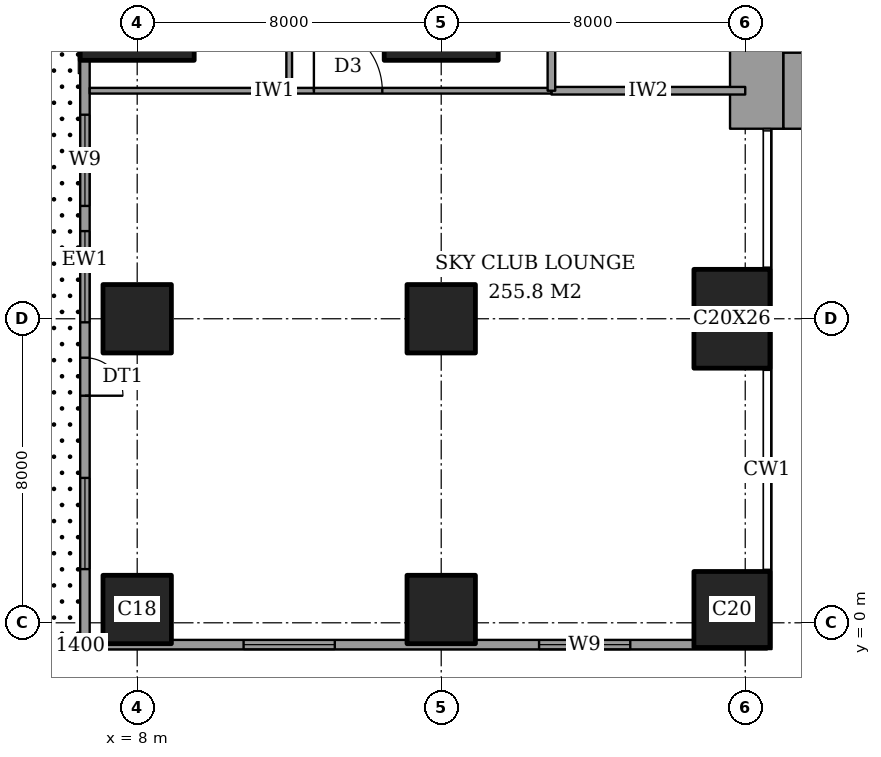
"""IFC4 building model, lengths in metres.
Left out: names, types, materials, properties, quantities, classifications, styles, units other than length and angle.
Written with IfcOpenShell. Run it as: python <this file> out.ifc"""

import sys

from ifc_helpers import new_model, si_unit, direction, frame, frame_2d, origin, origin_2d, place, context, subcontext, project, spatial, rectangle, extrude, element, fill, save


model = new_model("IFC4")
c1 = context("Model", 3, precision=1e-05, world=origin(), true_north=direction((0.0, 1.0)))
c2 = subcontext(c1, "Body", "Model", "MODEL_VIEW")
j1 = project(units=[si_unit("LENGTHUNIT", "METRE"), si_unit("PLANEANGLEUNIT", "RADIAN")], contexts=[c1])
p1 = place(None, origin())
s1 = spatial("IfcSite", under=j1, at=p1, CompositionType="ELEMENT")
p2 = place(p1, origin())
s2 = spatial("IfcBuilding", under=s1, at=p2, CompositionType="ELEMENT")
p3 = place(p2, frame((0.0, 0.0, 218.2)))
s3 = spatial("IfcBuildingStorey", under=s2, at=p3, CompositionType="ELEMENT", Elevation=218.2)
for number, where, z_axis, x_axis in (
    (1, (8.0, 0.35, 0.0), (0.0, 0.0, 1.0), (1.0, 0.0, 0.0)),
    (2, (8.0, 8.0, 0.0), (0.0, 0.0, 1.0), (1.0, 0.0, 0.0)),
):
    element("IfcColumn", number, at=place(p3, frame(where, z_axis=z_axis, x_axis=x_axis)), inside=s3, PredefinedType="COLUMN", context=c2, shape_type="SweptSolid", body=[
        extrude(rectangle(XDim=1.8, YDim=1.8, at=origin_2d()), origin(), (0.0, 0.0, 1.0), 3.6),
    ])
p4 = place(p3, frame((8.0, 16.0, 0.0), z_axis=(0.0, 0.0, 1.0), x_axis=(1.0, 0.0, 0.0)))
e3 = element("IfcColumn", 3, at=p4, inside=s3, PredefinedType="COLUMN", context=c2, shape_type="SweptSolid", body=[
    extrude(rectangle(XDim=3.0, YDim=2.4, at=origin_2d()), origin(), (0.0, 0.0, 1.0), 3.6),
])
for number, where, z_axis, x_axis in (
    (4, (16.0, 0.35, 0.0), (0.0, 0.0, 1.0), (1.0, 0.0, 0.0)),
    (5, (16.0, 8.0, 0.0), (0.0, 0.0, 1.0), (1.0, 0.0, 0.0)),
):
    element("IfcColumn", number, at=place(p3, frame(where, z_axis=z_axis, x_axis=x_axis)), inside=s3, PredefinedType="COLUMN", context=c2, shape_type="SweptSolid", body=[
        extrude(rectangle(XDim=1.8, YDim=1.8, at=origin_2d()), origin(), (0.0, 0.0, 1.0), 3.6),
    ])
p5 = place(p3, frame((16.0, 16.0, 0.0), z_axis=(0.0, 0.0, 1.0), x_axis=(1.0, 0.0, 0.0)))
e6 = element("IfcColumn", 6, at=p5, inside=s3, PredefinedType="COLUMN", context=c2, shape_type="SweptSolid", body=[
    extrude(rectangle(XDim=3.0, YDim=2.4, at=origin_2d()), origin(), (0.0, 0.0, 1.0), 3.6),
])
p6 = place(p3, frame((23.65, 0.35, 0.0), z_axis=(0.0, 0.0, 1.0), x_axis=(1.0, 0.0, 0.0)))
e7 = element("IfcColumn", 7, at=p6, inside=s3, PredefinedType="COLUMN", context=c2, shape_type="SweptSolid", body=[
    extrude(rectangle(XDim=2.0, YDim=2.0, at=origin_2d()), origin(), (0.0, 0.0, 1.0), 3.6),
])
p7 = place(p3, frame((23.65, 8.0, 0.0), z_axis=(0.0, 0.0, 1.0), x_axis=(1.0, 0.0, 0.0)))
e8 = element("IfcColumn", 8, at=p7, inside=s3, PredefinedType="COLUMN", context=c2, shape_type="SweptSolid", body=[
    extrude(rectangle(XDim=2.0, YDim=2.6, at=origin_2d()), origin(), (0.0, 0.0, 1.0), 3.6),
])
p8 = place(p3, frame((25.0, 14.0, 0.0), z_axis=(0.0, 0.0, 1.0), x_axis=(1.0, 0.0, 0.0)))
e9 = element("IfcWall", 9, at=p8, inside=s3, PredefinedType="SHEAR", context=c2, shape_type="SweptSolid", body=[
    extrude(rectangle(XDim=3.15, YDim=2.0, at=frame_2d((1.575, 0.0))), origin(), (0.0, 0.0, 1.0), 3.6),
])
p9 = place(p3, frame((24.3, 13.0, 0.0), z_axis=(0.0, 0.0, 1.0), x_axis=(0.0, 1.0, 0.0)))
e10 = element("IfcWall", 10, at=p9, inside=s3, PredefinedType="SHEAR", context=c2, shape_type="SweptSolid", body=[
    extrude(rectangle(XDim=10.15, YDim=1.4, at=frame_2d((5.075, 0.0))), origin(), (0.0, 0.0, 1.0), 3.6),
])
p10 = place(p3, frame((6.625, 19.65, 0.0), z_axis=(0.0, 0.0, 1.0), x_axis=(0.0, -1.0, 0.0)))
e11 = element("IfcWall", 11, at=p10, inside=s3, PredefinedType="SOLIDWALL", context=c2, shape_type="SweptSolid", body=[
    extrude(rectangle(XDim=20.225, YDim=0.25, at=frame_2d((10.112, 0.0))), origin(), (0.0, 0.0, 1.0), 3.6),
])
p11 = place(p10, frame((0.725, 0.0, 0.0)))
e12 = element("IfcOpeningElement", 12, at=p11, cuts=e11, PredefinedType="OPENING", context=c2, shape_type="SweptSolid", body=[
    extrude(rectangle(XDim=1.0, YDim=2.4, at=frame_2d((0.5, 1.2))), frame((0.0, 0.135, 0.0), z_axis=(0.0, -1.0, 0.0), x_axis=(1.0, 0.0, 0.0)), (0.0, 0.0, 1.0), 0.27),
])
p12 = place(p10, frame((12.675, 0.0, 0.0)))
e13 = element("IfcOpeningElement", 13, at=p12, cuts=e11, PredefinedType="OPENING", context=c2, shape_type="SweptSolid", body=[
    extrude(rectangle(XDim=1.0, YDim=2.4, at=frame_2d((0.5, 1.2))), frame((0.0, 0.135, 0.0), z_axis=(0.0, -1.0, 0.0), x_axis=(1.0, 0.0, 0.0)), (0.0, 0.0, 1.0), 0.27),
])
p13 = place(p10, frame((6.281, 0.0, 0.2)))
e14 = element("IfcOpeningElement", 14, at=p13, cuts=e11, PredefinedType="OPENING", context=c2, shape_type="SweptSolid", body=[
    extrude(rectangle(XDim=2.4, YDim=2.4, at=frame_2d((1.2, 1.2))), frame((0.0, 0.135, 0.0), z_axis=(0.0, -1.0, 0.0), x_axis=(1.0, 0.0, 0.0)), (0.0, 0.0, 1.0), 0.27),
])
p14 = place(p10, frame((9.344, 0.0, 0.2)))
e15 = element("IfcOpeningElement", 15, at=p14, cuts=e11, PredefinedType="OPENING", context=c2, shape_type="SweptSolid", body=[
    extrude(rectangle(XDim=2.4, YDim=2.4, at=frame_2d((1.2, 1.2))), frame((0.0, 0.135, 0.0), z_axis=(0.0, -1.0, 0.0), x_axis=(1.0, 0.0, 0.0)), (0.0, 0.0, 1.0), 0.27),
])
p15 = place(p10, frame((15.837, 0.0, 0.2)))
e16 = element("IfcOpeningElement", 16, at=p15, cuts=e11, PredefinedType="OPENING", context=c2, shape_type="SweptSolid", body=[
    extrude(rectangle(XDim=2.4, YDim=2.4, at=frame_2d((1.2, 1.2))), frame((0.0, 0.135, 0.0), z_axis=(0.0, -1.0, 0.0), x_axis=(1.0, 0.0, 0.0)), (0.0, 0.0, 1.0), 0.27),
])
p16 = place(p3, frame((6.625, -0.575, 0.0), z_axis=(0.0, 0.0, 1.0), x_axis=(1.0, 0.0, 0.0)))
e17 = element("IfcWall", 17, at=p16, inside=s3, PredefinedType="SOLIDWALL", context=c2, shape_type="SweptSolid", body=[
    extrude(rectangle(XDim=17.95, YDim=0.25, at=frame_2d((8.975, 0.0))), origin(), (0.0, 0.0, 1.0), 3.6),
])
p17 = place(p16, frame((4.175, 0.0, 0.2)))
e18 = element("IfcOpeningElement", 18, at=p17, cuts=e17, PredefinedType="OPENING", context=c2, shape_type="SweptSolid", body=[
    extrude(rectangle(XDim=2.4, YDim=2.4, at=frame_2d((1.2, 1.2))), frame((0.0, 0.135, 0.0), z_axis=(0.0, -1.0, 0.0), x_axis=(1.0, 0.0, 0.0)), (0.0, 0.0, 1.0), 0.27),
])
p18 = place(p16, frame((11.95, 0.0, 0.2)))
e19 = element("IfcOpeningElement", 19, at=p18, cuts=e17, PredefinedType="OPENING", context=c2, shape_type="SweptSolid", body=[
    extrude(rectangle(XDim=2.4, YDim=2.4, at=frame_2d((1.2, 1.2))), frame((0.0, 0.135, 0.0), z_axis=(0.0, -1.0, 0.0), x_axis=(1.0, 0.0, 0.0)), (0.0, 0.0, 1.0), 0.27),
])
p19 = place(p3, frame((18.9, 14.0, 0.0), z_axis=(0.0, 0.0, 1.0), x_axis=(1.0, 0.0, 0.0)))
e20 = element("IfcWall", 20, at=p19, inside=s3, PredefinedType="PARTITIONING", context=c2, shape_type="SweptSolid", body=[
    extrude(rectangle(XDim=5.1, YDim=0.2, at=frame_2d((2.55, 0.0))), origin(), (0.0, 0.0, 1.0), 3.35),
])
p20 = place(p3, frame((6.75, 14.0, 0.0), z_axis=(0.0, 0.0, 1.0), x_axis=(1.0, 0.0, 0.0)))
e21 = element("IfcWall", 21, at=p20, inside=s3, PredefinedType="PARTITIONING", context=c2, shape_type="SweptSolid", body=[
    extrude(rectangle(XDim=12.15, YDim=0.15, at=frame_2d((6.075, 0.0))), origin(), (0.0, 0.0, 1.0), 3.35),
])
p21 = place(p20, frame((5.9, 0.0, 0.0)))
e22 = element("IfcOpeningElement", 22, at=p21, cuts=e21, PredefinedType="OPENING", context=c2, shape_type="SweptSolid", body=[
    extrude(rectangle(XDim=1.8, YDim=2.1, at=frame_2d((0.9, 1.05))), frame((0.0, 0.085, 0.0), z_axis=(0.0, -1.0, 0.0), x_axis=(1.0, 0.0, 0.0)), (0.0, 0.0, 1.0), 0.17),
])
p22 = place(p3, frame((12.0, 14.0, 0.0), z_axis=(0.0, 0.0, 1.0), x_axis=(0.0, 1.0, 0.0)))
e23 = element("IfcWall", 23, at=p22, inside=s3, PredefinedType="PARTITIONING", context=c2, shape_type="SweptSolid", body=[
    extrude(rectangle(XDim=20.0, YDim=0.15, at=frame_2d((10.0, 0.0))), origin(), (0.0, 0.0, 1.0), 3.35),
])
p23 = place(p22, frame((9.1, 0.0, 0.0)))
e24 = element("IfcOpeningElement", 24, at=p23, cuts=e23, PredefinedType="OPENING", context=c2, shape_type="SweptSolid", body=[
    extrude(rectangle(XDim=1.8, YDim=2.1, at=frame_2d((0.9, 1.05))), frame((0.0, 0.085, 0.0), z_axis=(0.0, -1.0, 0.0), x_axis=(1.0, 0.0, 0.0)), (0.0, 0.0, 1.0), 0.17),
])
p24 = place(p3, frame((18.9, 14.0, 0.0), z_axis=(0.0, 0.0, 1.0), x_axis=(0.0, 1.0, 0.0)))
e25 = element("IfcWall", 25, at=p24, inside=s3, PredefinedType="PARTITIONING", context=c2, shape_type="SweptSolid", body=[
    extrude(rectangle(XDim=6.0, YDim=0.2, at=frame_2d((3.0, 0.0))), origin(), (0.0, 0.0, 1.0), 3.35),
])
p25 = place(p24, frame((1.3, 0.0, 0.0)))
e26 = element("IfcOpeningElement", 26, at=p25, cuts=e25, PredefinedType="OPENING", context=c2, shape_type="SweptSolid", body=[
    extrude(rectangle(XDim=0.9, YDim=2.1, at=frame_2d((0.45, 1.05))), frame((0.0, 0.11, 0.0), z_axis=(0.0, -1.0, 0.0), x_axis=(1.0, 0.0, 0.0)), (0.0, 0.0, 1.0), 0.22),
])
p26 = place(p24, frame((4.3, 0.0, 0.0)))
e27 = element("IfcOpeningElement", 27, at=p26, cuts=e25, PredefinedType="OPENING", context=c2, shape_type="SweptSolid", body=[
    extrude(rectangle(XDim=0.9, YDim=2.1, at=frame_2d((0.45, 1.05))), frame((0.0, 0.11, 0.0), z_axis=(0.0, -1.0, 0.0), x_axis=(1.0, 0.0, 0.0)), (0.0, 0.0, 1.0), 0.22),
])
p27 = place(p12, origin())
e28 = element("IfcDoor", 28, at=p27, inside=s3, OperationType="SINGLE_SWING_LEFT", PredefinedType="DOOR", context=c2, shape_type="SweptSolid", body=[
    extrude(rectangle(XDim=1.0, YDim=2.4, at=frame_2d((0.5, 1.2))), frame((0.0, 0.025, 0.0), z_axis=(0.0, -1.0, 0.0), x_axis=(1.0, 0.0, 0.0)), (0.0, 0.0, 1.0), 0.05),
])
fill(e13, e28)
p28 = place(p13, origin())
e29 = element("IfcWindow", 29, at=p28, inside=s3, PartitioningType="SINGLE_PANEL", PredefinedType="WINDOW", context=c2, shape_type="SweptSolid", body=[
    extrude(rectangle(XDim=2.4, YDim=2.4, at=frame_2d((1.2, 1.2))), frame((0.0, 0.03, 0.0), z_axis=(0.0, -1.0, 0.0), x_axis=(1.0, 0.0, 0.0)), (0.0, 0.0, 1.0), 0.06),
])
fill(e14, e29)
p29 = place(p14, origin())
e30 = element("IfcWindow", 30, at=p29, inside=s3, PartitioningType="SINGLE_PANEL", PredefinedType="WINDOW", context=c2, shape_type="SweptSolid", body=[
    extrude(rectangle(XDim=2.4, YDim=2.4, at=frame_2d((1.2, 1.2))), frame((0.0, 0.03, 0.0), z_axis=(0.0, -1.0, 0.0), x_axis=(1.0, 0.0, 0.0)), (0.0, 0.0, 1.0), 0.06),
])
fill(e15, e30)
p30 = place(p15, origin())
e31 = element("IfcWindow", 31, at=p30, inside=s3, PartitioningType="SINGLE_PANEL", PredefinedType="WINDOW", context=c2, shape_type="SweptSolid", body=[
    extrude(rectangle(XDim=2.4, YDim=2.4, at=frame_2d((1.2, 1.2))), frame((0.0, 0.03, 0.0), z_axis=(0.0, -1.0, 0.0), x_axis=(1.0, 0.0, 0.0)), (0.0, 0.0, 1.0), 0.06),
])
fill(e16, e31)
p31 = place(p17, origin())
e32 = element("IfcWindow", 32, at=p31, inside=s3, PartitioningType="SINGLE_PANEL", PredefinedType="WINDOW", context=c2, shape_type="SweptSolid", body=[
    extrude(rectangle(XDim=2.4, YDim=2.4, at=frame_2d((1.2, 1.2))), frame((0.0, 0.03, 0.0), z_axis=(0.0, -1.0, 0.0), x_axis=(1.0, 0.0, 0.0)), (0.0, 0.0, 1.0), 0.06),
])
fill(e18, e32)
p32 = place(p18, origin())
e33 = element("IfcWindow", 33, at=p32, inside=s3, PartitioningType="SINGLE_PANEL", PredefinedType="WINDOW", context=c2, shape_type="SweptSolid", body=[
    extrude(rectangle(XDim=2.4, YDim=2.4, at=frame_2d((1.2, 1.2))), frame((0.0, 0.03, 0.0), z_axis=(0.0, -1.0, 0.0), x_axis=(1.0, 0.0, 0.0)), (0.0, 0.0, 1.0), 0.06),
])
fill(e19, e33)
p33 = place(p21, origin())
e34 = element("IfcDoor", 34, at=p33, inside=s3, OperationType="DOUBLE_DOOR_DOUBLE_SWING", PredefinedType="DOOR", context=c2, shape_type="SweptSolid", body=[
    extrude(rectangle(XDim=1.8, YDim=2.1, at=frame_2d((0.9, 1.05))), frame((0.0, 0.025, 0.0), z_axis=(0.0, -1.0, 0.0), x_axis=(1.0, 0.0, 0.0)), (0.0, 0.0, 1.0), 0.05),
])
fill(e22, e34)
save(model, sys.argv[1])
